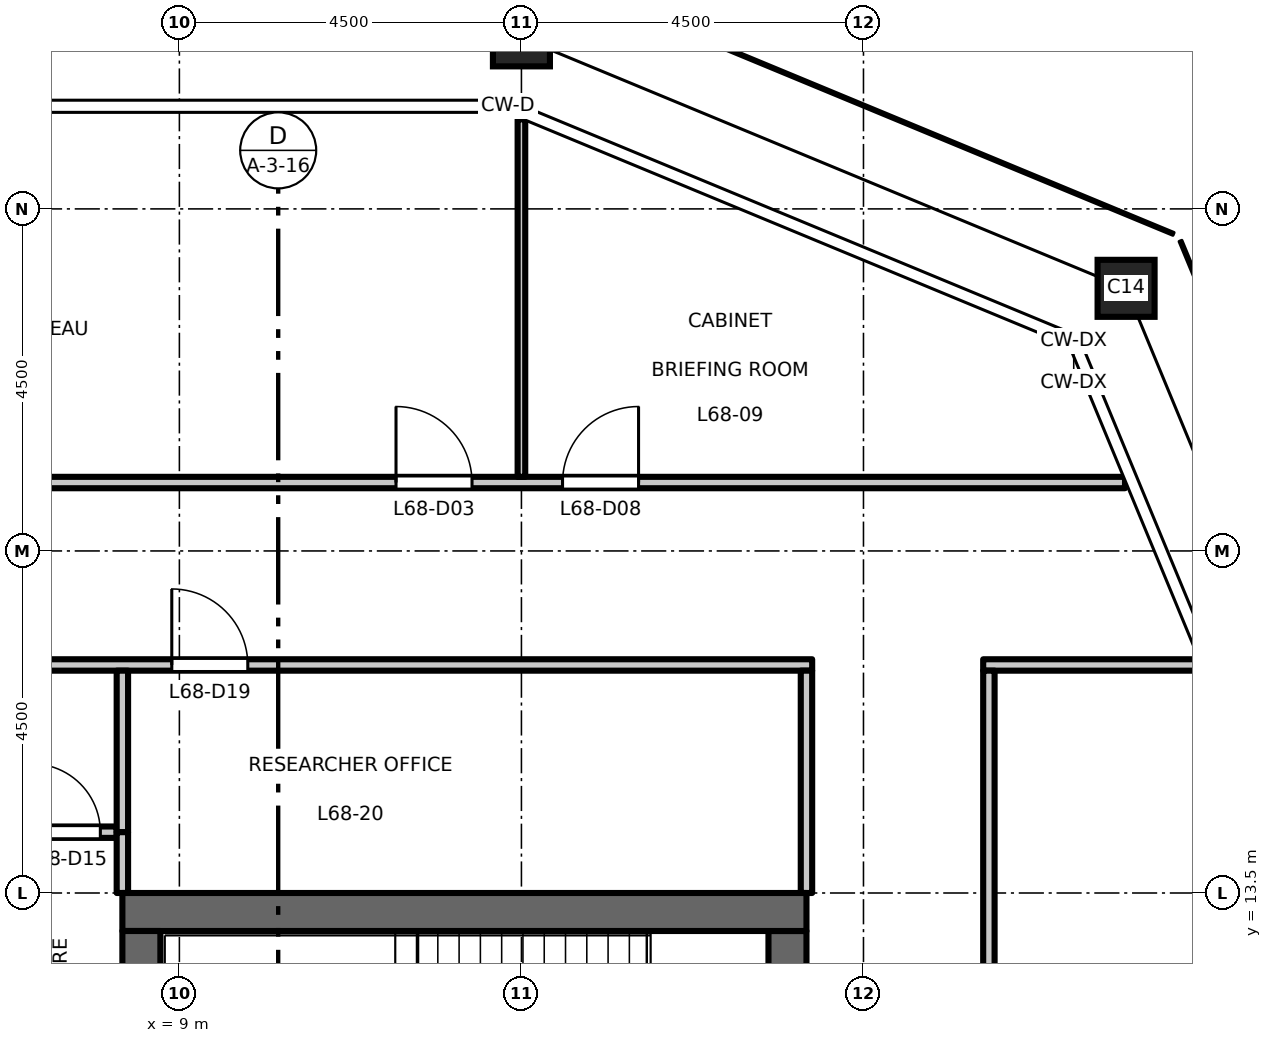
"""IFC4 building model, lengths in metres.
Left out: names, types, materials, properties, quantities, classifications, styles, units other than length and angle.
Written with IfcOpenShell. Run it as: python <this file> out.ifc"""

import sys

from ifc_helpers import new_model, si_unit, direction, frame, frame_2d, origin, origin_2d, place, context, subcontext, project, spatial, rectangle, hollow_rectangle, extrude, element, fill, save


model = new_model("IFC4")
c1 = context("Model", 3, precision=1e-05, world=origin(), true_north=direction((0.0, 1.0)))
c2 = subcontext(c1, "Body", "Model", "MODEL_VIEW")
j1 = project(units=[si_unit("LENGTHUNIT", "METRE"), si_unit("PLANEANGLEUNIT", "RADIAN")], contexts=[c1])
p1 = place(None, origin())
s1 = spatial("IfcSite", under=j1, at=p1, CompositionType="ELEMENT")
p2 = place(p1, origin())
s2 = spatial("IfcBuilding", under=s1, at=p2, CompositionType="ELEMENT")
p3 = place(p2, frame((0.0, 0.0, 316.7)))
s3 = spatial("IfcBuildingStorey", under=s2, at=p3, CompositionType="ELEMENT", Elevation=316.7)
for number, where, z_axis, x_axis in (
    (1, (21.455, 21.455, 0.0), (0.0, 0.0, 1.0), (1.0, 0.0, 0.0)),
    (2, (13.5, 24.75, 0.0), (0.0, 0.0, 1.0), (1.0, 0.0, 0.0)),
):
    element("IfcColumn", number, at=place(p3, frame(where, z_axis=z_axis, x_axis=x_axis)), inside=s3, PredefinedType="COLUMN", context=c2, shape_type="SweptSolid", body=[
        extrude(hollow_rectangle(XDim=0.75, YDim=0.75, WallThickness=0.04, at=origin_2d()), origin(), (0.0, 0.0, 1.0), 4.5),
    ])
p4 = place(p3, frame((17.0, -13.0, 0.0), z_axis=(0.0, 0.0, 1.0), x_axis=(0.0, 1.0, 0.0)))
e3 = element("IfcWall", 3, at=p4, inside=s3, PredefinedType="SHEAR", context=c2, shape_type="SweptSolid", body=[
    extrude(rectangle(XDim=26.0, YDim=0.5, at=frame_2d((13.0, 0.0))), origin(), (0.0, 0.0, 1.0), 4.35),
])
p5 = place(p4, frame((16.825, 0.0, 0.0)))
e4 = element("IfcOpeningElement", 4, at=p5, cuts=e3, PredefinedType="OPENING", context=c2, shape_type="SweptSolid", body=[
    extrude(rectangle(XDim=1.8, YDim=2.1, at=frame_2d((0.9, 1.05))), frame((0.0, 0.26, 0.0), z_axis=(0.0, -1.0, 0.0), x_axis=(1.0, 0.0, 0.0)), (0.0, 0.0, 1.0), 0.52),
])
p6 = place(p4, frame((7.375, 0.0, 0.0)))
e5 = element("IfcOpeningElement", 5, at=p6, cuts=e3, PredefinedType="OPENING", context=c2, shape_type="SweptSolid", body=[
    extrude(rectangle(XDim=1.8, YDim=2.1, at=frame_2d((0.9, 1.05))), frame((0.0, 0.26, 0.0), z_axis=(0.0, -1.0, 0.0), x_axis=(1.0, 0.0, 0.0)), (0.0, 0.0, 1.0), 0.52),
])
p7 = place(p3, frame((8.25, 13.25, 0.0), z_axis=(0.0, 0.0, 1.0), x_axis=(1.0, 0.0, 0.0)))
e6 = element("IfcWall", 6, at=p7, inside=s3, PredefinedType="SHEAR", context=c2, shape_type="SweptSolid", body=[
    extrude(rectangle(XDim=9.0, YDim=0.5, at=frame_2d((4.5, 0.0))), origin(), (0.0, 0.0, 1.0), 4.35),
])
p8 = place(p3, frame((8.5, -13.0, 0.0), z_axis=(0.0, 0.0, 1.0), x_axis=(0.0, 1.0, 0.0)))
e7 = element("IfcWall", 7, at=p8, inside=s3, PredefinedType="SHEAR", context=c2, shape_type="SweptSolid", body=[
    extrude(rectangle(XDim=26.0, YDim=0.5, at=frame_2d((13.0, 0.0))), origin(), (0.0, 0.0, 1.0), 4.35),
])
p9 = place(p3, frame((6.66, 14.3, 0.0), z_axis=(0.0, 0.0, 1.0), x_axis=(1.0, 0.0, 0.0)))
e8 = element("IfcWall", 8, at=p9, inside=s3, PredefinedType="PARTITIONING", context=c2, shape_type="SweptSolid", body=[
    extrude(rectangle(XDim=1.515, YDim=0.15, at=frame_2d((0.758, 0.0))), origin(), (0.0, 0.0, 1.0), 4.35),
])
p10 = place(p9, frame((0.4, 0.0, 0.0)))
e9 = element("IfcOpeningElement", 9, at=p10, cuts=e8, PredefinedType="OPENING", context=c2, shape_type="SweptSolid", body=[
    extrude(rectangle(XDim=0.9, YDim=2.1, at=frame_2d((0.45, 1.05))), frame((0.0, 0.085, 0.0), z_axis=(0.0, -1.0, 0.0), x_axis=(1.0, 0.0, 0.0)), (0.0, 0.0, 1.0), 0.17),
])
p11 = place(p3, frame((-17.325, 16.5, 0.0), z_axis=(0.0, 0.0, 1.0), x_axis=(1.0, 0.0, 0.0)))
e10 = element("IfcWall", 10, at=p11, inside=s3, PredefinedType="PARTITIONING", context=c2, shape_type="SweptSolid", body=[
    extrude(rectangle(XDim=34.65, YDim=0.15, at=frame_2d((17.325, 0.0))), origin(), (0.0, 0.0, 1.0), 4.35),
])
p12 = place(p11, frame((9.725, 0.0, 0.0)))
e11 = element("IfcOpeningElement", 11, at=p12, cuts=e10, PredefinedType="OPENING", context=c2, shape_type="SweptSolid", body=[
    extrude(rectangle(XDim=1.0, YDim=2.1, at=frame_2d((0.5, 1.05))), frame((0.0, 0.085, 0.0), z_axis=(0.0, -1.0, 0.0), x_axis=(1.0, 0.0, 0.0)), (0.0, 0.0, 1.0), 0.17),
])
p13 = place(p11, frame((7.475, 0.0, 0.0)))
e12 = element("IfcOpeningElement", 12, at=p13, cuts=e10, PredefinedType="OPENING", context=c2, shape_type="SweptSolid", body=[
    extrude(rectangle(XDim=1.0, YDim=2.1, at=frame_2d((0.5, 1.05))), frame((0.0, 0.085, 0.0), z_axis=(0.0, -1.0, 0.0), x_axis=(1.0, 0.0, 0.0)), (0.0, 0.0, 1.0), 0.17),
])
p14 = place(p11, frame((26.225, 0.0, 0.0)))
e13 = element("IfcOpeningElement", 13, at=p14, cuts=e10, PredefinedType="OPENING", context=c2, shape_type="SweptSolid", body=[
    extrude(rectangle(XDim=1.0, YDim=2.1, at=frame_2d((0.5, 1.05))), frame((0.0, 0.085, 0.0), z_axis=(0.0, -1.0, 0.0), x_axis=(1.0, 0.0, 0.0)), (0.0, 0.0, 1.0), 0.17),
])
p15 = place(p3, frame((19.575, 16.5, 0.0), z_axis=(0.0, 0.0, 1.0), x_axis=(1.0, 0.0, 0.0)))
e14 = element("IfcWall", 14, at=p15, inside=s3, PredefinedType="PARTITIONING", context=c2, shape_type="SweptSolid", body=[
    extrude(rectangle(XDim=2.861, YDim=0.15, at=frame_2d((1.431, 0.0))), origin(), (0.0, 0.0, 1.0), 4.35),
])
p16 = place(p3, frame((-21.441, 18.9, 0.0), z_axis=(0.0, 0.0, 1.0), x_axis=(1.0, 0.0, 0.0)))
e15 = element("IfcWall", 15, at=p16, inside=s3, PredefinedType="PARTITIONING", context=c2, shape_type="SweptSolid", body=[
    extrude(rectangle(XDim=42.882, YDim=0.15, at=frame_2d((21.441, 0.0))), origin(), (0.0, 0.0, 1.0), 4.35),
])
p17 = place(p16, frame((15.291, 0.0, 0.0)))
e16 = element("IfcOpeningElement", 16, at=p17, cuts=e15, PredefinedType="OPENING", context=c2, shape_type="SweptSolid", body=[
    extrude(rectangle(XDim=1.0, YDim=2.1, at=frame_2d((0.5, 1.05))), frame((0.0, 0.085, 0.0), z_axis=(0.0, -1.0, 0.0), x_axis=(1.0, 0.0, 0.0)), (0.0, 0.0, 1.0), 0.17),
])
p18 = place(p16, frame((17.541, 0.0, 0.0)))
e17 = element("IfcOpeningElement", 17, at=p18, cuts=e15, PredefinedType="OPENING", context=c2, shape_type="SweptSolid", body=[
    extrude(rectangle(XDim=1.0, YDim=2.1, at=frame_2d((0.5, 1.05))), frame((0.0, 0.085, 0.0), z_axis=(0.0, -1.0, 0.0), x_axis=(1.0, 0.0, 0.0)), (0.0, 0.0, 1.0), 0.17),
])
p19 = place(p16, frame((33.291, 0.0, 0.0)))
e18 = element("IfcOpeningElement", 18, at=p19, cuts=e15, PredefinedType="OPENING", context=c2, shape_type="SweptSolid", body=[
    extrude(rectangle(XDim=1.0, YDim=2.1, at=frame_2d((0.5, 1.05))), frame((0.0, 0.085, 0.0), z_axis=(0.0, -1.0, 0.0), x_axis=(1.0, 0.0, 0.0)), (0.0, 0.0, 1.0), 0.17),
])
p20 = place(p16, frame((6.291, 0.0, 0.0)))
e19 = element("IfcOpeningElement", 19, at=p20, cuts=e15, PredefinedType="OPENING", context=c2, shape_type="SweptSolid", body=[
    extrude(rectangle(XDim=1.0, YDim=2.1, at=frame_2d((0.5, 1.05))), frame((0.0, 0.085, 0.0), z_axis=(0.0, -1.0, 0.0), x_axis=(1.0, 0.0, 0.0)), (0.0, 0.0, 1.0), 0.17),
])
p21 = place(p16, frame((35.482, 0.0, 0.0)))
e20 = element("IfcOpeningElement", 20, at=p21, cuts=e15, PredefinedType="OPENING", context=c2, shape_type="SweptSolid", body=[
    extrude(rectangle(XDim=1.0, YDim=2.1, at=frame_2d((0.5, 1.05))), frame((0.0, 0.085, 0.0), z_axis=(0.0, -1.0, 0.0), x_axis=(1.0, 0.0, 0.0)), (0.0, 0.0, 1.0), 0.17),
])
p22 = place(p3, frame((8.25, 14.3, 0.0), z_axis=(0.0, 0.0, 1.0), x_axis=(0.0, 1.0, 0.0)))
e21 = element("IfcWall", 21, at=p22, inside=s3, PredefinedType="PARTITIONING", context=c2, shape_type="SweptSolid", body=[
    extrude(rectangle(XDim=2.125, YDim=0.15, at=frame_2d((1.062, 0.0))), origin(), (0.0, 0.0, 1.0), 4.35),
])
p23 = place(p3, frame((8.25, 13.5, 0.0), z_axis=(0.0, 0.0, 1.0), x_axis=(0.0, 1.0, 0.0)))
e22 = element("IfcWall", 22, at=p23, inside=s3, PredefinedType="PARTITIONING", context=c2, shape_type="SweptSolid", body=[
    extrude(rectangle(XDim=0.8, YDim=0.15, at=frame_2d((0.4, 0.0))), origin(), (0.0, 0.0, 1.0), 4.35),
])
p24 = place(p3, frame((13.5, 18.975, 0.0), z_axis=(0.0, 0.0, 1.0), x_axis=(0.0, 1.0, 0.0)))
e23 = element("IfcWall", 23, at=p24, inside=s3, PredefinedType="PARTITIONING", context=c2, shape_type="SweptSolid", body=[
    extrude(rectangle(XDim=4.703, YDim=0.1, at=frame_2d((2.352, 0.0))), origin(), (0.0, 0.0, 1.0), 3.75),
])
p25 = place(p3, frame((17.25, 13.5, 0.0), z_axis=(0.0, 0.0, 1.0), x_axis=(0.0, 1.0, 0.0)))
e24 = element("IfcWall", 24, at=p25, inside=s3, PredefinedType="PARTITIONING", context=c2, shape_type="SweptSolid", body=[
    extrude(rectangle(XDim=2.925, YDim=0.15, at=frame_2d((1.462, 0.0))), origin(), (0.0, 0.0, 1.0), 4.35),
])
p26 = place(p3, frame((19.65, -16.42, 0.0), z_axis=(0.0, 0.0, 1.0), x_axis=(0.0, 1.0, 0.0)))
e25 = element("IfcWall", 25, at=p26, inside=s3, PredefinedType="PARTITIONING", context=c2, shape_type="SweptSolid", body=[
    extrude(rectangle(XDim=32.845, YDim=0.15, at=frame_2d((16.422, 0.0))), origin(), (0.0, 0.0, 1.0), 4.35),
])
p27 = place(p26, frame((0.575, 0.0, 0.0)))
e26 = element("IfcOpeningElement", 26, at=p27, cuts=e25, PredefinedType="OPENING", context=c2, shape_type="SweptSolid", body=[
    extrude(rectangle(XDim=1.0, YDim=2.1, at=frame_2d((0.5, 1.05))), frame((0.0, 0.085, 0.0), z_axis=(0.0, -1.0, 0.0), x_axis=(1.0, 0.0, 0.0)), (0.0, 0.0, 1.0), 0.17),
])
p28 = place(p19, origin())
e27 = element("IfcDoor", 27, at=p28, inside=s3, OperationType="SINGLE_SWING_LEFT", PredefinedType="DOOR", context=c2, shape_type="SweptSolid", body=[
    extrude(rectangle(XDim=1.0, YDim=2.1, at=frame_2d((0.5, 1.05))), frame((0.0, 0.025, 0.0), z_axis=(0.0, -1.0, 0.0), x_axis=(1.0, 0.0, 0.0)), (0.0, 0.0, 1.0), 0.05),
])
fill(e18, e27)
p29 = place(p21, origin())
e28 = element("IfcDoor", 28, at=p29, inside=s3, OperationType="SINGLE_SWING_RIGHT", PredefinedType="DOOR", context=c2, shape_type="SweptSolid", body=[
    extrude(rectangle(XDim=1.0, YDim=2.1, at=frame_2d((0.5, 1.05))), frame((0.0, 0.025, 0.0), z_axis=(0.0, -1.0, 0.0), x_axis=(1.0, 0.0, 0.0)), (0.0, 0.0, 1.0), 0.05),
])
fill(e20, e28)
p30 = place(p10, origin())
e29 = element("IfcDoor", 29, at=p30, inside=s3, OperationType="SINGLE_SWING_LEFT", PredefinedType="DOOR", context=c2, shape_type="SweptSolid", body=[
    extrude(rectangle(XDim=0.9, YDim=2.1, at=frame_2d((0.45, 1.05))), frame((0.0, 0.025, 0.0), z_axis=(0.0, -1.0, 0.0), x_axis=(1.0, 0.0, 0.0)), (0.0, 0.0, 1.0), 0.05),
])
fill(e9, e29)
p31 = place(p14, origin())
e30 = element("IfcDoor", 30, at=p31, inside=s3, OperationType="SINGLE_SWING_LEFT", PredefinedType="DOOR", context=c2, shape_type="SweptSolid", body=[
    extrude(rectangle(XDim=1.0, YDim=2.1, at=frame_2d((0.5, 1.05))), frame((0.0, 0.025, 0.0), z_axis=(0.0, -1.0, 0.0), x_axis=(1.0, 0.0, 0.0)), (0.0, 0.0, 1.0), 0.05),
])
fill(e13, e30)
save(model, sys.argv[1])
